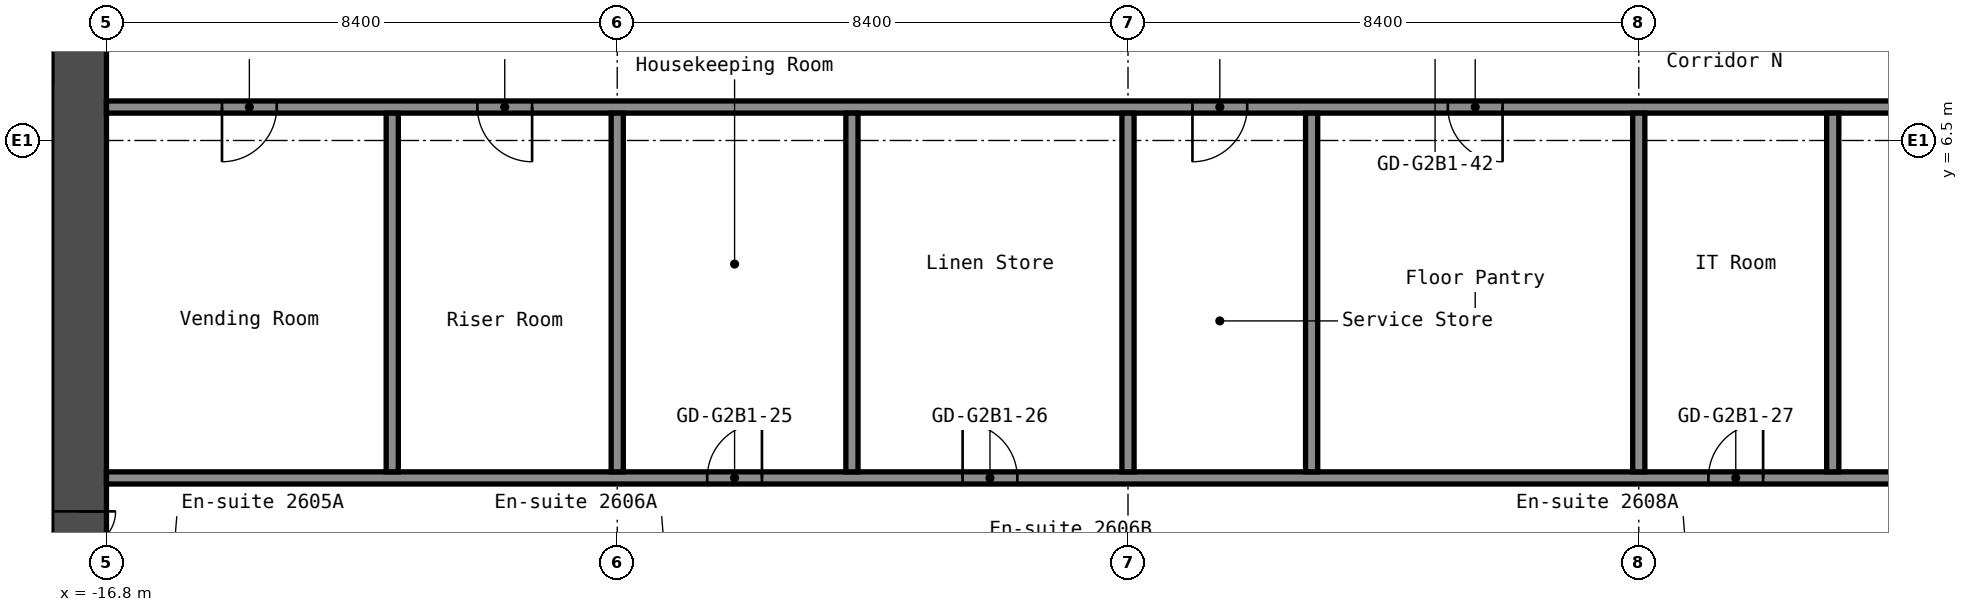
"""IFC4 building model, lengths in metres.
Left out: names, types, materials, properties, quantities, classifications, styles, units other than length and angle.
Written with IfcOpenShell. Run it as: python <this file> out.ifc"""

import sys

from ifc_helpers import new_model, si_unit, direction, frame, frame_2d, origin, place, context, subcontext, project, spatial, rectangle, extrude, element, fill, save


model = new_model("IFC4")
c1 = context("Model", 3, precision=1e-05, world=origin(), true_north=direction((0.0, 1.0)))
c2 = subcontext(c1, "Body", "Model", "MODEL_VIEW")
j1 = project(units=[si_unit("LENGTHUNIT", "METRE"), si_unit("PLANEANGLEUNIT", "RADIAN")], contexts=[c1])
p1 = place(None, origin())
s1 = spatial("IfcSite", under=j1, at=p1, CompositionType="ELEMENT")
p2 = place(p1, origin())
s2 = spatial("IfcBuilding", under=s1, at=p2, CompositionType="ELEMENT")
p3 = place(p2, frame((0.0, 0.0, 94.6)))
s3 = spatial("IfcBuildingStorey", under=s2, at=p3, CompositionType="ELEMENT", Elevation=94.6)
p4 = place(p3, frame((-17.25, -8.4, 0.0), z_axis=(0.0, 0.0, 1.0), x_axis=(0.0, 1.0, 0.0)))
e1 = element("IfcWall", 1, at=p4, inside=s3, PredefinedType="SHEAR", context=c2, shape_type="SweptSolid", body=[
    extrude(rectangle(XDim=16.8, YDim=0.9, at=frame_2d((8.4, 0.0))), origin(), (0.0, 0.0, 1.0), 2.8),
])
p5 = place(p4, frame((7.6, 0.0, 0.0)))
e2 = element("IfcOpeningElement", 2, at=p5, cuts=e1, PredefinedType="OPENING", context=c2, shape_type="SweptSolid", body=[
    extrude(rectangle(XDim=1.2, YDim=2.1, at=frame_2d((0.6, 1.05))), frame((0.0, 0.46, 0.0), z_axis=(0.0, -1.0, 0.0), x_axis=(1.0, 0.0, 0.0)), (0.0, 0.0, 1.0), 0.92),
])
p6 = place(p3, frame((-16.8, 0.95, 0.0), z_axis=(0.0, 0.0, 1.0), x_axis=(1.0, 0.0, 0.0)))
e3 = element("IfcWall", 3, at=p6, inside=s3, PredefinedType="PARTITIONING", context=c2, shape_type="SweptSolid", body=[
    extrude(rectangle(XDim=33.6, YDim=0.2, at=frame_2d((16.8, 0.0))), origin(), (0.0, 0.0, 1.0), 2.8),
])
p7 = place(p6, frame((9.88, 0.0, 0.0)))
e4 = element("IfcOpeningElement", 4, at=p7, cuts=e3, PredefinedType="OPENING", context=c2, shape_type="SweptSolid", body=[
    extrude(rectangle(XDim=0.9, YDim=2.1, at=frame_2d((0.45, 1.05))), frame((0.0, 0.11, 0.0), z_axis=(0.0, -1.0, 0.0), x_axis=(1.0, 0.0, 0.0)), (0.0, 0.0, 1.0), 0.22),
])
p8 = place(p6, frame((14.08, 0.0, 0.0)))
e5 = element("IfcOpeningElement", 5, at=p8, cuts=e3, PredefinedType="OPENING", context=c2, shape_type="SweptSolid", body=[
    extrude(rectangle(XDim=0.9, YDim=2.1, at=frame_2d((0.45, 1.05))), frame((0.0, 0.11, 0.0), z_axis=(0.0, -1.0, 0.0), x_axis=(1.0, 0.0, 0.0)), (0.0, 0.0, 1.0), 0.22),
])
p9 = place(p6, frame((26.345, 0.0, 0.0)))
e6 = element("IfcOpeningElement", 6, at=p9, cuts=e3, PredefinedType="OPENING", context=c2, shape_type="SweptSolid", body=[
    extrude(rectangle(XDim=0.9, YDim=2.1, at=frame_2d((0.45, 1.05))), frame((0.0, 0.11, 0.0), z_axis=(0.0, -1.0, 0.0), x_axis=(1.0, 0.0, 0.0)), (0.0, 0.0, 1.0), 0.22),
])
p10 = place(p6, frame((30.545, 0.0, 0.0)))
e7 = element("IfcOpeningElement", 7, at=p10, cuts=e3, PredefinedType="OPENING", context=c2, shape_type="SweptSolid", body=[
    extrude(rectangle(XDim=0.9, YDim=2.1, at=frame_2d((0.45, 1.05))), frame((0.0, 0.11, 0.0), z_axis=(0.0, -1.0, 0.0), x_axis=(1.0, 0.0, 0.0)), (0.0, 0.0, 1.0), 0.22),
])
p11 = place(p3, frame((-16.8, 7.05, 0.0), z_axis=(0.0, 0.0, 1.0), x_axis=(1.0, 0.0, 0.0)))
e8 = element("IfcWall", 8, at=p11, inside=s3, PredefinedType="PARTITIONING", context=c2, shape_type="SweptSolid", body=[
    extrude(rectangle(XDim=33.6, YDim=0.2, at=frame_2d((16.8, 0.0))), origin(), (0.0, 0.0, 1.0), 2.8),
])
p12 = place(p11, frame((1.9, 0.0, 0.0)))
e9 = element("IfcOpeningElement", 9, at=p12, cuts=e8, PredefinedType="OPENING", context=c2, shape_type="SweptSolid", body=[
    extrude(rectangle(XDim=0.9, YDim=2.1, at=frame_2d((0.45, 1.05))), frame((0.0, 0.11, 0.0), z_axis=(0.0, -1.0, 0.0), x_axis=(1.0, 0.0, 0.0)), (0.0, 0.0, 1.0), 0.22),
])
p13 = place(p11, frame((6.1, 0.0, 0.0)))
e10 = element("IfcOpeningElement", 10, at=p13, cuts=e8, PredefinedType="OPENING", context=c2, shape_type="SweptSolid", body=[
    extrude(rectangle(XDim=0.9, YDim=2.1, at=frame_2d((0.45, 1.05))), frame((0.0, 0.11, 0.0), z_axis=(0.0, -1.0, 0.0), x_axis=(1.0, 0.0, 0.0)), (0.0, 0.0, 1.0), 0.22),
])
p14 = place(p11, frame((17.86, 0.0, 0.0)))
e11 = element("IfcOpeningElement", 11, at=p14, cuts=e8, PredefinedType="OPENING", context=c2, shape_type="SweptSolid", body=[
    extrude(rectangle(XDim=0.9, YDim=2.1, at=frame_2d((0.45, 1.05))), frame((0.0, 0.11, 0.0), z_axis=(0.0, -1.0, 0.0), x_axis=(1.0, 0.0, 0.0)), (0.0, 0.0, 1.0), 0.22),
])
p15 = place(p11, frame((22.06, 0.0, 0.0)))
e12 = element("IfcOpeningElement", 12, at=p15, cuts=e8, PredefinedType="OPENING", context=c2, shape_type="SweptSolid", body=[
    extrude(rectangle(XDim=0.9, YDim=2.1, at=frame_2d((0.45, 1.05))), frame((0.0, 0.11, 0.0), z_axis=(0.0, -1.0, 0.0), x_axis=(1.0, 0.0, 0.0)), (0.0, 0.0, 1.0), 0.22),
])
for number, where, z_axis, x_axis in (
    (13, (-12.1, 1.05, 0.0), (0.0, 0.0, 1.0), (0.0, 1.0, 0.0)),
    (14, (-8.4, 1.05, 0.0), (0.0, 0.0, 1.0), (0.0, 1.0, 0.0)),
    (15, (-4.54, 1.05, 0.0), (0.0, 0.0, 1.0), (0.0, 1.0, 0.0)),
    (16, (0.0, 1.05, 0.0), (0.0, 0.0, 1.0), (0.0, 1.0, 0.0)),
    (17, (3.02, 1.05, 0.0), (0.0, 0.0, 1.0), (0.0, 1.0, 0.0)),
    (18, (8.4, 1.05, 0.0), (0.0, 0.0, 1.0), (0.0, 1.0, 0.0)),
    (19, (11.59, 1.05, 0.0), (0.0, 0.0, 1.0), (0.0, 1.0, 0.0)),
):
    element("IfcWall", number, at=place(p3, frame(where, z_axis=z_axis, x_axis=x_axis)), inside=s3, PredefinedType="PARTITIONING", context=c2, shape_type="SweptSolid", body=[
        extrude(rectangle(XDim=5.9, YDim=0.2, at=frame_2d((2.95, 0.0))), origin(), (0.0, 0.0, 1.0), 2.8),
    ])
p16 = place(p5, origin())
e20 = element("IfcDoor", 20, at=p16, inside=s3, OperationType="DOUBLE_DOOR_SINGLE_SWING", PredefinedType="DOOR", context=c2, shape_type="SweptSolid", body=[
    extrude(rectangle(XDim=1.2, YDim=2.1, at=frame_2d((0.6, 1.05))), frame((0.0, 0.025, 0.0), z_axis=(0.0, -1.0, 0.0), x_axis=(1.0, 0.0, 0.0)), (0.0, 0.0, 1.0), 0.05),
])
fill(e2, e20)
p17 = place(p7, origin())
e21 = element("IfcDoor", 21, at=p17, inside=s3, OperationType="SINGLE_SWING_LEFT", PredefinedType="DOOR", context=c2, shape_type="SweptSolid", body=[
    extrude(rectangle(XDim=0.9, YDim=2.1, at=frame_2d((0.45, 1.05))), frame((0.0, 0.025, 0.0), z_axis=(0.0, -1.0, 0.0), x_axis=(1.0, 0.0, 0.0)), (0.0, 0.0, 1.0), 0.05),
])
fill(e4, e21)
p18 = place(p8, origin())
e22 = element("IfcDoor", 22, at=p18, inside=s3, OperationType="SINGLE_SWING_RIGHT", PredefinedType="DOOR", context=c2, shape_type="SweptSolid", body=[
    extrude(rectangle(XDim=0.9, YDim=2.1, at=frame_2d((0.45, 1.05))), frame((0.0, 0.025, 0.0), z_axis=(0.0, -1.0, 0.0), x_axis=(1.0, 0.0, 0.0)), (0.0, 0.0, 1.0), 0.05),
])
fill(e5, e22)
p19 = place(p9, origin())
e23 = element("IfcDoor", 23, at=p19, inside=s3, OperationType="SINGLE_SWING_LEFT", PredefinedType="DOOR", context=c2, shape_type="SweptSolid", body=[
    extrude(rectangle(XDim=0.9, YDim=2.1, at=frame_2d((0.45, 1.05))), frame((0.0, 0.025, 0.0), z_axis=(0.0, -1.0, 0.0), x_axis=(1.0, 0.0, 0.0)), (0.0, 0.0, 1.0), 0.05),
])
fill(e6, e23)
p20 = place(p12, origin())
e24 = element("IfcDoor", 24, at=p20, inside=s3, OperationType="SINGLE_SWING_LEFT", PredefinedType="DOOR", context=c2, shape_type="SweptSolid", body=[
    extrude(rectangle(XDim=0.9, YDim=2.1, at=frame_2d((0.45, 1.05))), frame((0.0, 0.025, 0.0), z_axis=(0.0, -1.0, 0.0), x_axis=(1.0, 0.0, 0.0)), (0.0, 0.0, 1.0), 0.05),
])
fill(e9, e24)
p21 = place(p13, origin())
e25 = element("IfcDoor", 25, at=p21, inside=s3, OperationType="SINGLE_SWING_RIGHT", PredefinedType="DOOR", context=c2, shape_type="SweptSolid", body=[
    extrude(rectangle(XDim=0.9, YDim=2.1, at=frame_2d((0.45, 1.05))), frame((0.0, 0.025, 0.0), z_axis=(0.0, -1.0, 0.0), x_axis=(1.0, 0.0, 0.0)), (0.0, 0.0, 1.0), 0.05),
])
fill(e10, e25)
p22 = place(p14, origin())
e26 = element("IfcDoor", 26, at=p22, inside=s3, OperationType="SINGLE_SWING_LEFT", PredefinedType="DOOR", context=c2, shape_type="SweptSolid", body=[
    extrude(rectangle(XDim=0.9, YDim=2.1, at=frame_2d((0.45, 1.05))), frame((0.0, 0.025, 0.0), z_axis=(0.0, -1.0, 0.0), x_axis=(1.0, 0.0, 0.0)), (0.0, 0.0, 1.0), 0.05),
])
fill(e11, e26)
p23 = place(p15, origin())
e27 = element("IfcDoor", 27, at=p23, inside=s3, OperationType="SINGLE_SWING_RIGHT", PredefinedType="DOOR", context=c2, shape_type="SweptSolid", body=[
    extrude(rectangle(XDim=0.9, YDim=2.1, at=frame_2d((0.45, 1.05))), frame((0.0, 0.025, 0.0), z_axis=(0.0, -1.0, 0.0), x_axis=(1.0, 0.0, 0.0)), (0.0, 0.0, 1.0), 0.05),
])
fill(e12, e27)
save(model, sys.argv[1])
